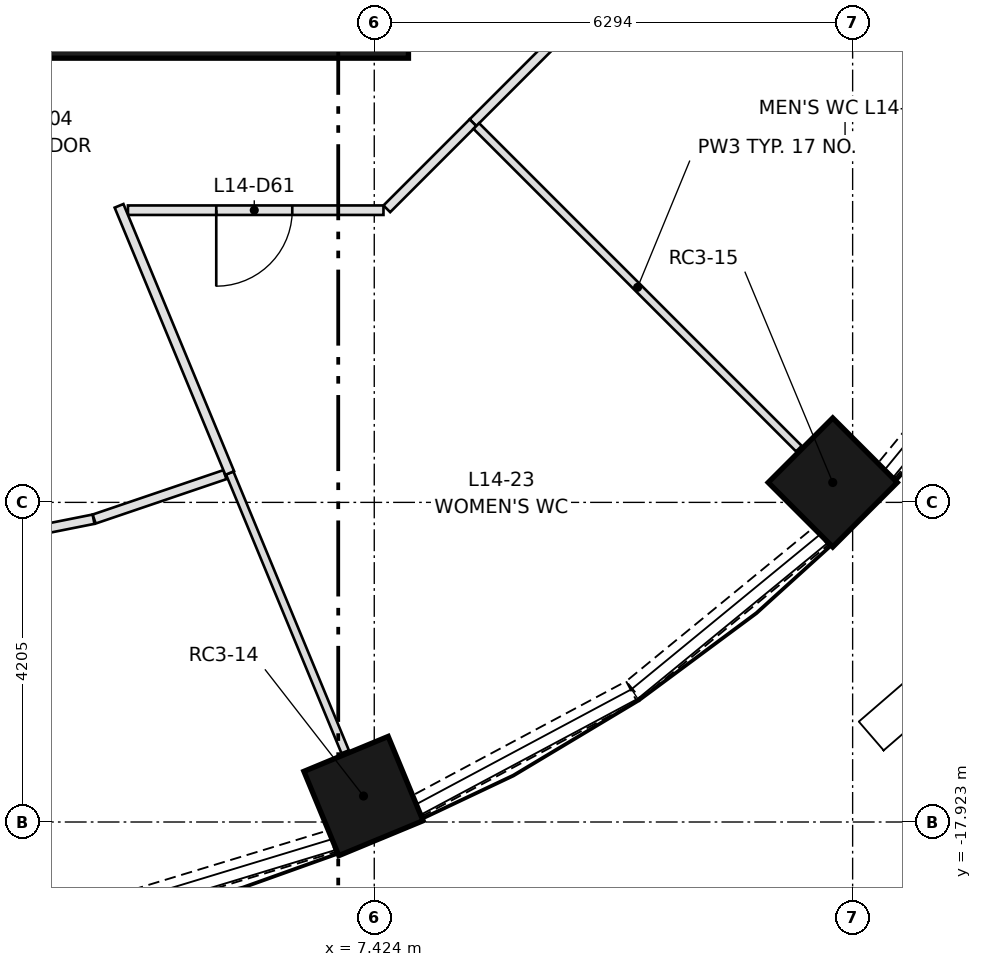
"""IFC4 building model, lengths in metres.
Left out: names, types, materials, properties, quantities, classifications, styles, units other than length and angle.
Written with IfcOpenShell. Run it as: python <this file> out.ifc"""

import sys

from ifc_helpers import new_model, si_unit, direction, frame, frame_2d, origin, origin_2d, place, context, subcontext, project, spatial, rectangle, extrude, element, fill, save


model = new_model("IFC4")
c1 = context("Model", 3, precision=1e-05, world=origin(), true_north=direction((0.0, 1.0)))
c2 = subcontext(c1, "Body", "Model", "MODEL_VIEW")
j1 = project(units=[si_unit("LENGTHUNIT", "METRE"), si_unit("PLANEANGLEUNIT", "RADIAN")], contexts=[c1])
p1 = place(None, origin())
s1 = spatial("IfcSite", under=j1, at=p1, CompositionType="ELEMENT")
p2 = place(p1, origin())
s2 = spatial("IfcBuilding", under=s1, at=p2, CompositionType="ELEMENT")
p3 = place(p2, frame((0.0, 0.0, 55.4)))
s3 = spatial("IfcBuildingStorey", under=s2, at=p3, CompositionType="ELEMENT", Elevation=55.4)
for number, where, z_axis, x_axis in (
    (1, (7.282, -17.582, 0.0), (0.0, 0.0, 1.0), (0.383, -0.924, 0.0)),
    (2, (13.456, -13.456, 0.0), (0.0, 0.0, 1.0), (0.707, -0.707, 0.0)),
):
    element("IfcColumn", number, at=place(p3, frame(where, z_axis=z_axis, x_axis=x_axis)), inside=s3, PredefinedType="COLUMN", context=c2, shape_type="SweptSolid", body=[
        extrude(rectangle(XDim=1.2, YDim=1.2, at=origin_2d()), origin(), (0.0, 0.0, 1.0), 3.65),
    ])
p4 = place(p3, frame((-7.874, -7.424, 0.0), z_axis=(0.0, 0.0, 1.0), x_axis=(1.0, 0.0, 0.0)))
e3 = element("IfcWall", 3, at=p4, inside=s3, PredefinedType="SHEAR", context=c2, shape_type="SweptSolid", body=[
    extrude(rectangle(XDim=15.748, YDim=0.9, at=frame_2d((7.874, 0.0))), origin(), (0.0, 0.0, 1.0), 3.65),
])
p5 = place(p3, frame((3.814, -19.102, 0.0), z_axis=(0.0, 0.0, 1.0), x_axis=(0.956849017819, 0.290585541792, 0.0)))
e4 = element("IfcWall", 4, at=p5, inside=s3, PredefinedType="SOLIDWALL", context=c2, shape_type="SweptSolid", body=[
    extrude(rectangle(XDim=3.188, YDim=0.3, at=frame_2d((1.594, 0.0))), origin(), (0.0, 0.0, 1.0), 0.9),
])
p6 = place(p3, frame((7.998, -17.706, 0.0), z_axis=(0.0, 0.0, 1.0), x_axis=(0.881994263934, 0.471260138764, 0.0)))
e5 = element("IfcWall", 5, at=p6, inside=s3, PredefinedType="SOLIDWALL", context=c2, shape_type="SweptSolid", body=[
    extrude(rectangle(XDim=3.187, YDim=0.3, at=frame_2d((1.593, 0.0))), origin(), (0.0, 0.0, 1.0), 0.9),
])
for number, where, z_axis, x_axis in (
    (6, (10.833, -16.188, 0.0), (0.0, 0.0, 1.0), (0.773, 0.634, 0.0)),
    (7, (14.166, -13.298, 0.0), (0.0, 0.0, 1.0), (0.634, 0.773, 0.0)),
):
    element("IfcWall", number, at=place(p3, frame(where, z_axis=z_axis, x_axis=x_axis)), inside=s3, PredefinedType="SOLIDWALL", context=c2, shape_type="SweptSolid", body=[
        extrude(rectangle(XDim=3.188, YDim=0.3, at=frame_2d((1.594, 0.0))), origin(), (0.0, 0.0, 1.0), 0.9),
    ])
p7 = place(p3, frame((9.856, -7.589, 0.0), z_axis=(0.0, 0.0, 1.0), x_axis=(-0.70718294931, -0.707030604857, 0.0)))
e8 = element("IfcWall", 8, at=p7, inside=s3, PredefinedType="PARTITIONING", context=c2, shape_type="SweptSolid", body=[
    extrude(rectangle(XDim=1.603, YDim=0.125, at=frame_2d((0.801, 0.0))), origin(), (0.0, 0.0, 1.0), 3.3),
])
p8 = place(p3, frame((7.545, -9.874, 0.0), z_axis=(0.0, 0.0, 1.0), x_axis=(-1.0, 0.0, 0.0)))
e9 = element("IfcWall", 9, at=p8, inside=s3, PredefinedType="PARTITIONING", context=c2, shape_type="SweptSolid", body=[
    extrude(rectangle(XDim=3.362, YDim=0.125, at=frame_2d((1.681, 0.0))), origin(), (0.0, 0.0, 1.0), 3.3),
])
p9 = place(p8, frame((1.2, 0.0, 0.0)))
e10 = element("IfcOpeningElement", 10, at=p9, cuts=e9, PredefinedType="OPENING", context=c2, shape_type="SweptSolid", body=[
    extrude(rectangle(XDim=1.0, YDim=2.1, at=frame_2d((0.5, 1.05))), frame((0.0, 0.073, 0.0), z_axis=(0.0, -1.0, 0.0), x_axis=(1.0, 0.0, 0.0)), (0.0, 0.0, 1.0), 0.145),
])
p10 = place(p3, frame((8.722, -8.722, 0.0), z_axis=(0.0, 0.0, 1.0), x_axis=(-0.707030604857, -0.70718294931, 0.0)))
e11 = element("IfcWall", 11, at=p10, inside=s3, PredefinedType="PARTITIONING", context=c2, shape_type="SweptSolid", body=[
    extrude(rectangle(XDim=1.603, YDim=0.125, at=frame_2d((0.801, 0.0))), origin(), (0.0, 0.0, 1.0), 3.3),
])
p11 = place(p3, frame((1.887, -14.306, 0.0), z_axis=(0.0, 0.0, 1.0), x_axis=(0.980804871908, 0.194991803011, 0.0)))
e12 = element("IfcWall", 12, at=p11, inside=s3, PredefinedType="PARTITIONING", context=c2, shape_type="SweptSolid", body=[
    extrude(rectangle(XDim=1.879, YDim=0.125, at=frame_2d((0.94, 0.0))), origin(), (0.0, 0.0, 1.0), 3.3),
])
p12 = place(p3, frame((3.739, -13.937, 0.0), z_axis=(0.0, 0.0, 1.0), x_axis=(0.946921731465, 0.32146420404, 0.0)))
e13 = element("IfcWall", 13, at=p12, inside=s3, PredefinedType="PARTITIONING", context=c2, shape_type="SweptSolid", body=[
    extrude(rectangle(XDim=1.817, YDim=0.125, at=frame_2d((0.908, 0.0))), origin(), (0.0, 0.0, 1.0), 3.3),
])
p13 = place(p3, frame((5.522, -13.332, 0.0), z_axis=(0.0, 0.0, 1.0), x_axis=(0.382675844596, -0.923882675432, 0.0)))
e14 = element("IfcWall", 14, at=p13, inside=s3, PredefinedType="PARTITIONING", context=c2, shape_type="SweptSolid", body=[
    extrude(rectangle(XDim=3.97, YDim=0.105, at=frame_2d((1.985, 0.0))), origin(), (0.0, 0.0, 1.0), 3.3),
])
p14 = place(p3, frame((4.066, -9.816, 0.0), z_axis=(0.0, 0.0, 1.0), x_axis=(0.382746586719, -0.923853370592, 0.0)))
e15 = element("IfcWall", 15, at=p14, inside=s3, PredefinedType="PARTITIONING", context=c2, shape_type="SweptSolid", body=[
    extrude(rectangle(XDim=3.805, YDim=0.125, at=frame_2d((1.902, 0.0))), origin(), (0.0, 0.0, 1.0), 3.3),
])
p15 = place(p3, frame((8.767, -8.767, 0.0), z_axis=(0.0, 0.0, 1.0), x_axis=(0.707106781187, -0.707106781187, 0.0)))
e16 = element("IfcWall", 16, at=p15, inside=s3, PredefinedType="PARTITIONING", context=c2, shape_type="SweptSolid", body=[
    extrude(rectangle(XDim=6.002, YDim=0.105, at=frame_2d((3.001, 0.0))), origin(), (0.0, 0.0, 1.0), 3.3),
])
p16 = place(p9, origin())
e17 = element("IfcDoor", 17, at=p16, inside=s3, OperationType="SINGLE_SWING_RIGHT", PredefinedType="DOOR", context=c2, shape_type="SweptSolid", body=[
    extrude(rectangle(XDim=1.0, YDim=2.1, at=frame_2d((0.5, 1.05))), frame((0.0, 0.025, 0.0), z_axis=(0.0, -1.0, 0.0), x_axis=(1.0, 0.0, 0.0)), (0.0, 0.0, 1.0), 0.05),
])
fill(e10, e17)
save(model, sys.argv[1])
